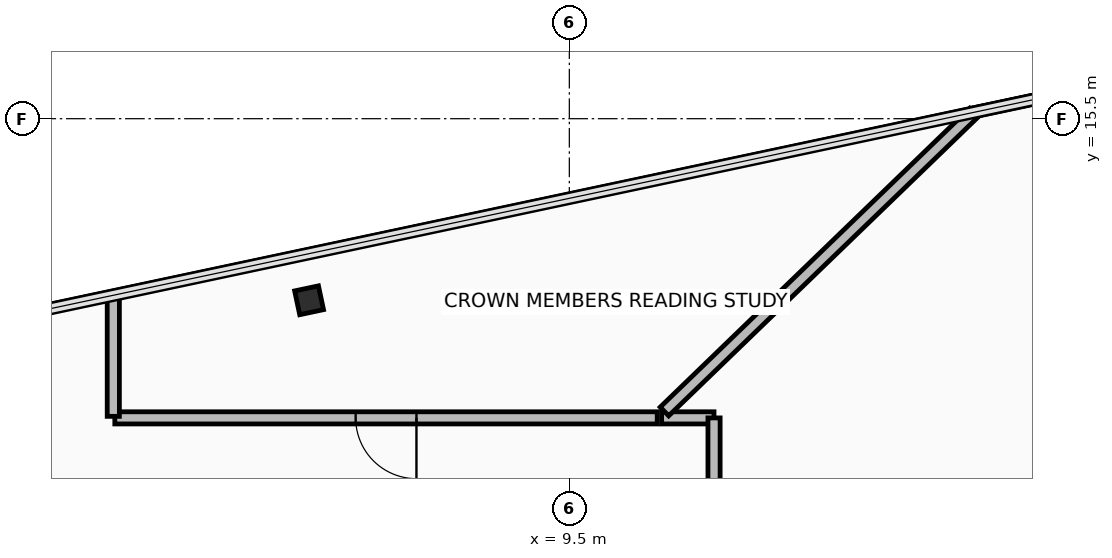
"""IFC4 building model, lengths in metres.
Left out: names, types, materials, properties, quantities, classifications, styles, units other than length and angle.
Written with IfcOpenShell. Run it as: python <this file> out.ifc"""

import sys

from ifc_helpers import new_model, si_unit, direction, frame, frame_2d, origin, origin_2d, place, context, subcontext, project, spatial, rectangle, hollow_rectangle, extrude, element, fill, save


model = new_model("IFC4")
c1 = context("Model", 3, precision=1e-05, world=origin(), true_north=direction((0.0, 1.0)))
c2 = subcontext(c1, "Body", "Model", "MODEL_VIEW")
j1 = project(units=[si_unit("LENGTHUNIT", "METRE"), si_unit("PLANEANGLEUNIT", "RADIAN")], contexts=[c1])
p1 = place(None, origin())
s1 = spatial("IfcSite", under=j1, at=p1, CompositionType="ELEMENT")
p2 = place(p1, origin())
s2 = spatial("IfcBuilding", under=s1, at=p2, CompositionType="ELEMENT")
p3 = place(p2, frame((0.0, 0.0, 290.7)))
s3 = spatial("IfcBuildingStorey", under=s2, at=p3, CompositionType="ELEMENT", Elevation=290.7)
p4 = place(p3, frame((5.22, 12.514, 0.0), z_axis=(0.0, 0.0, 1.0), x_axis=(0.978147237858, 0.207913398007, 0.0)))
e1 = element("IfcColumn", 1, at=p4, inside=s3, PredefinedType="COLUMN", context=c2, shape_type="SweptSolid", body=[
    extrude(hollow_rectangle(XDim=0.4, YDim=0.4, WallThickness=0.025, at=origin_2d()), origin(), (0.0, 0.0, 1.0), 3.65),
])
p5 = place(p3, frame((11.879, 10.58, 0.0), z_axis=(0.0, 0.0, 1.0), x_axis=(-1.0, 0.0, 0.0)))
e2 = element("IfcWall", 2, at=p5, inside=s3, PredefinedType="PARTITIONING", context=c2, shape_type="SweptSolid", body=[
    extrude(rectangle(XDim=0.862, YDim=0.2, at=frame_2d((0.431, 0.0))), origin(), (0.0, 0.0, 1.0), 3.465),
])
p6 = place(p3, frame((11.065, 10.685, 0.0), z_axis=(0.0, 0.0, 1.0), x_axis=(0.719349741171, 0.694648076278, 0.0)))
e3 = element("IfcWall", 3, at=p6, inside=s3, PredefinedType="PARTITIONING", context=c2, shape_type="SweptSolid", body=[
    extrude(rectangle(XDim=7.077, YDim=0.2, at=frame_2d((3.538, 0.0))), origin(), (0.0, 0.0, 1.0), 2.81),
])
p7 = place(p3, frame((16.167, 15.607, 0.0), z_axis=(0.0, 0.0, 1.0), x_axis=(0.978147425174, 0.207912516762, 0.0)))
e4 = element("IfcWall", 4, at=p7, inside=s3, PredefinedType="PARTITIONING", context=c2, shape_type="SweptSolid", body=[
    extrude(rectangle(XDim=4.508, YDim=0.15, at=frame_2d((2.254, 0.0))), origin(), (0.0, 0.0, 1.0), 3.465),
])
p8 = place(p3, frame((11.88, -2.505, 0.0), z_axis=(0.0, 0.0, 1.0), x_axis=(0.0, 1.0, 0.0)))
e5 = element("IfcWall", 5, at=p8, inside=s3, PredefinedType="PARTITIONING", context=c2, shape_type="SweptSolid", body=[
    extrude(rectangle(XDim=13.084, YDim=0.2, at=frame_2d((6.542, 0.0))), origin(), (0.0, 0.0, 1.0), 2.96),
])
p9 = place(p8, frame((6.117, 0.0, 0.0)))
e6 = element("IfcOpeningElement", 6, at=p9, cuts=e5, PredefinedType="OPENING", context=c2, shape_type="SweptSolid", body=[
    extrude(rectangle(XDim=0.85, YDim=2.1, at=frame_2d((0.425, 1.05))), frame((0.0, 0.11, 0.0), z_axis=(0.0, -1.0, 0.0), x_axis=(1.0, 0.0, 0.0)), (0.0, 0.0, 1.0), 0.22),
])
p10 = place(p3, frame((10.946, 10.58, 0.0), z_axis=(0.0, 0.0, 1.0), x_axis=(-1.0, 0.0, 0.0)))
e7 = element("IfcWall", 7, at=p10, inside=s3, PredefinedType="PARTITIONING", context=c2, shape_type="SweptSolid", body=[
    extrude(rectangle(XDim=8.921, YDim=0.2, at=frame_2d((4.46, 0.0))), origin(), (0.0, 0.0, 1.0), 2.96),
])
p11 = place(p10, frame((3.96, 0.0, 0.0)))
e8 = element("IfcOpeningElement", 8, at=p11, cuts=e7, PredefinedType="OPENING", context=c2, shape_type="SweptSolid", body=[
    extrude(rectangle(XDim=1.0, YDim=2.15, at=frame_2d((0.5, 1.075))), frame((0.0, 0.11, 0.0), z_axis=(0.0, -1.0, 0.0), x_axis=(1.0, 0.0, 0.0)), (0.0, 0.0, 1.0), 0.22),
])
p12 = place(p3, frame((2.0, 10.605, 0.0), z_axis=(0.0, 0.0, 1.0), x_axis=(0.0, 1.0, 0.0)))
e9 = element("IfcWall", 9, at=p12, inside=s3, PredefinedType="PARTITIONING", context=c2, shape_type="SweptSolid", body=[
    extrude(rectangle(XDim=1.991, YDim=0.2, at=frame_2d((0.996, 0.0))), origin(), (0.0, 0.0, 1.0), 2.81),
])
p13 = place(p11, origin())
e10 = element("IfcDoor", 10, at=p13, inside=s3, OperationType="SINGLE_SWING_RIGHT", PredefinedType="DOOR", context=c2, shape_type="SweptSolid", body=[
    extrude(rectangle(XDim=1.0, YDim=2.15, at=frame_2d((0.5, 1.075))), frame((0.0, 0.025, 0.0), z_axis=(0.0, -1.0, 0.0), x_axis=(1.0, 0.0, 0.0)), (0.0, 0.0, 1.0), 0.05),
])
fill(e8, e10)
save(model, sys.argv[1])
